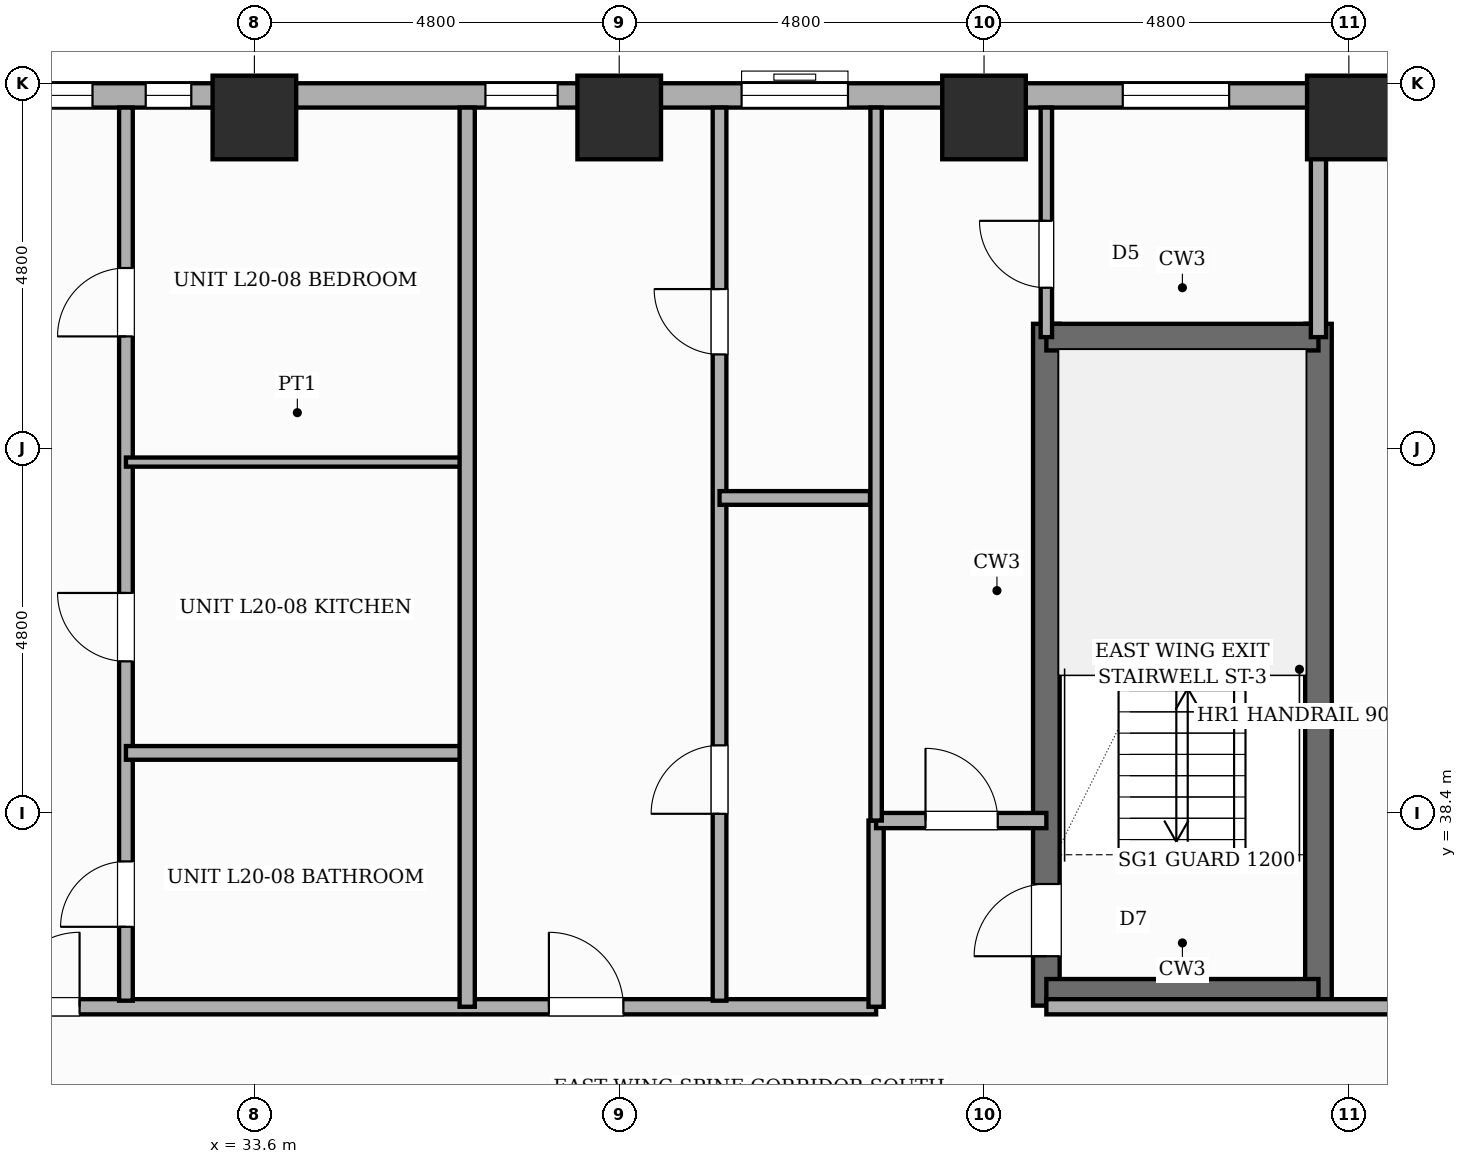
"""IFC4 building model, lengths in metres.
Left out: names, types, materials, properties, quantities, classifications, styles, units other than length and angle.
Written with IfcOpenShell. Run it as: python <this file> out.ifc"""

import sys

from ifc_helpers import new_model, si_unit, direction, frame, frame_2d, origin, origin_2d, place, context, subcontext, project, spatial, rectangle, extrude, element, fill, save


model = new_model("IFC4")
c1 = context("Model", 3, precision=1e-05, world=origin(), true_north=direction((0.0, 1.0)))
c2 = subcontext(c1, "Body", "Model", "MODEL_VIEW")
j1 = project(units=[si_unit("LENGTHUNIT", "METRE"), si_unit("PLANEANGLEUNIT", "RADIAN")], contexts=[c1])
p1 = place(None, origin())
s1 = spatial("IfcSite", under=j1, at=p1, CompositionType="ELEMENT")
p2 = place(p1, origin())
s2 = spatial("IfcBuilding", under=s1, at=p2, CompositionType="ELEMENT")
p3 = place(p2, frame((0.0, 0.0, 79.0)))
s3 = spatial("IfcBuildingStorey", under=s2, at=p3, CompositionType="ELEMENT", Elevation=79.0)
p4 = place(p3, frame((44.02, 35.865, 0.0), z_axis=(0.0, 0.0, 1.0), x_axis=(0.0, 1.0, 0.0)))
e1 = element("IfcWall", 1, at=p4, inside=s3, PredefinedType="SHEAR", context=c2, shape_type="SweptSolid", body=[
    extrude(rectangle(XDim=8.97, YDim=0.35, at=frame_2d((4.485, 0.0))), origin(), (0.0, 0.0, 1.0), 3.6),
])
p5 = place(p4, frame((0.65, 0.0, 0.0)))
e2 = element("IfcOpeningElement", 2, at=p5, cuts=e1, PredefinedType="OPENING", context=c2, shape_type="SweptSolid", body=[
    extrude(rectangle(XDim=0.95, YDim=2.1, at=frame_2d((0.475, 1.05))), frame((0.0, 0.185, 0.0), z_axis=(0.0, -1.0, 0.0), x_axis=(1.0, 0.0, 0.0)), (0.0, 0.0, 1.0), 0.37),
])
p6 = place(p3, frame((47.6, 35.865, 0.0), z_axis=(0.0, 0.0, 1.0), x_axis=(0.0, 1.0, 0.0)))
e3 = element("IfcWall", 3, at=p6, inside=s3, PredefinedType="SHEAR", context=c2, shape_type="SweptSolid", body=[
    extrude(rectangle(XDim=8.97, YDim=0.35, at=frame_2d((4.485, 0.0))), origin(), (0.0, 0.0, 1.0), 3.6),
])
for number, where, z_axis, x_axis in (
    (4, (44.02, 36.04, 0.0), (0.0, 0.0, 1.0), (1.0, 0.0, 0.0)),
    (5, (44.02, 44.66, 0.0), (0.0, 0.0, 1.0), (1.0, 0.0, 0.0)),
):
    element("IfcWall", number, at=place(p3, frame(where, z_axis=z_axis, x_axis=x_axis)), inside=s3, PredefinedType="SHEAR", context=c2, shape_type="SweptSolid", body=[
        extrude(rectangle(XDim=3.58, YDim=0.35, at=frame_2d((1.79, 0.0))), origin(), (0.0, 0.0, 1.0), 3.6),
    ])
for number, where, z_axis, x_axis in (
    (6, (33.6, 47.55, 0.0), (0.0, 0.0, 1.0), (1.0, 0.0, 0.0)),
    (7, (38.4, 47.55, 0.0), (0.0, 0.0, 1.0), (1.0, 0.0, 0.0)),
    (8, (43.2, 47.55, 0.0), (0.0, 0.0, 1.0), (1.0, 0.0, 0.0)),
    (9, (48.0, 47.55, 0.0), (0.0, 0.0, 1.0), (1.0, 0.0, 0.0)),
):
    element("IfcColumn", number, at=place(p3, frame(where, z_axis=z_axis, x_axis=x_axis)), inside=s3, PredefinedType="COLUMN", context=c2, shape_type="SweptSolid", body=[
        extrude(rectangle(XDim=1.1, YDim=1.1, at=origin_2d()), origin(), (0.0, 0.0, 1.0), 3.6),
    ])
p7 = place(p3, frame((7.2, 47.84, 0.0), z_axis=(0.0, 0.0, 1.0), x_axis=(1.0, 0.0, 0.0)))
e10 = element("IfcWall", 10, at=p7, inside=s3, PredefinedType="STANDARD", context=c2, shape_type="SweptSolid", body=[
    extrude(rectangle(XDim=48.0, YDim=0.32, at=frame_2d((24.0, 0.0))), origin(), (0.0, 0.0, 1.0), 2.53),
])
p8 = place(p7, frame((24.97, 0.0, 0.45)))
e11 = element("IfcOpeningElement", 11, at=p8, cuts=e10, PredefinedType="OPENING", context=c2, shape_type="SweptSolid", body=[
    extrude(rectangle(XDim=0.6, YDim=1.8, at=frame_2d((0.3, 0.9))), frame((0.0, 0.17, 0.0), z_axis=(0.0, -1.0, 0.0), x_axis=(1.0, 0.0, 0.0)), (0.0, 0.0, 1.0), 0.34),
])
p9 = place(p7, frame((29.44, 0.0, 0.45)))
e12 = element("IfcOpeningElement", 12, at=p9, cuts=e10, PredefinedType="OPENING", context=c2, shape_type="SweptSolid", body=[
    extrude(rectangle(XDim=0.95, YDim=1.8, at=frame_2d((0.475, 0.9))), frame((0.0, 0.17, 0.0), z_axis=(0.0, -1.0, 0.0), x_axis=(1.0, 0.0, 0.0)), (0.0, 0.0, 1.0), 0.34),
])
p10 = place(p7, frame((43.414, 0.0, 0.45)))
e13 = element("IfcOpeningElement", 13, at=p10, cuts=e10, PredefinedType="OPENING", context=c2, shape_type="SweptSolid", body=[
    extrude(rectangle(XDim=0.95, YDim=1.8, at=frame_2d((0.475, 0.9))), frame((0.0, 0.17, 0.0), z_axis=(0.0, -1.0, 0.0), x_axis=(1.0, 0.0, 0.0)), (0.0, 0.0, 1.0), 0.34),
])
p11 = place(p7, frame((18.74, 0.0, 0.45)))
e14 = element("IfcOpeningElement", 14, at=p11, cuts=e10, PredefinedType="OPENING", context=c2, shape_type="SweptSolid", body=[
    extrude(rectangle(XDim=0.95, YDim=1.8, at=frame_2d((0.475, 0.9))), frame((0.0, 0.17, 0.0), z_axis=(0.0, -1.0, 0.0), x_axis=(1.0, 0.0, 0.0)), (0.0, 0.0, 1.0), 0.34),
])
p12 = place(p7, frame((37.825, 0.0, 0.65)))
e15 = element("IfcOpeningElement", 15, at=p12, cuts=e10, PredefinedType="OPENING", context=c2, shape_type="SweptSolid", body=[
    extrude(rectangle(XDim=1.4, YDim=1.1, at=frame_2d((0.7, 0.55))), frame((0.0, 0.17, 0.0), z_axis=(0.0, -1.0, 0.0), x_axis=(1.0, 0.0, 0.0)), (0.0, 0.0, 1.0), 0.34),
])
p13 = place(p7, frame((0.47, 0.0, 0.45)))
e16 = element("IfcOpeningElement", 16, at=p13, cuts=e10, PredefinedType="OPENING", context=c2, shape_type="SweptSolid", body=[
    extrude(rectangle(XDim=0.95, YDim=1.8, at=frame_2d((0.475, 0.9))), frame((0.0, 0.17, 0.0), z_axis=(0.0, -1.0, 0.0), x_axis=(1.0, 0.0, 0.0)), (0.0, 0.0, 1.0), 0.34),
])
p14 = place(p7, frame((5.265, 0.0, 0.45)))
e17 = element("IfcOpeningElement", 17, at=p14, cuts=e10, PredefinedType="OPENING", context=c2, shape_type="SweptSolid", body=[
    extrude(rectangle(XDim=0.95, YDim=1.8, at=frame_2d((0.475, 0.9))), frame((0.0, 0.17, 0.0), z_axis=(0.0, -1.0, 0.0), x_axis=(1.0, 0.0, 0.0)), (0.0, 0.0, 1.0), 0.34),
])
p15 = place(p7, frame((22.87, 0.0, 0.65)))
e18 = element("IfcOpeningElement", 18, at=p15, cuts=e10, PredefinedType="OPENING", context=c2, shape_type="SweptSolid", body=[
    extrude(rectangle(XDim=1.4, YDim=1.1, at=frame_2d((0.7, 0.55))), frame((0.0, 0.17, 0.0), z_axis=(0.0, -1.0, 0.0), x_axis=(1.0, 0.0, 0.0)), (0.0, 0.0, 1.0), 0.34),
])
p16 = place(p7, frame((32.81, 0.0, 0.65)))
e19 = element("IfcOpeningElement", 19, at=p16, cuts=e10, PredefinedType="OPENING", context=c2, shape_type="SweptSolid", body=[
    extrude(rectangle(XDim=1.4, YDim=1.1, at=frame_2d((0.7, 0.55))), frame((0.0, 0.17, 0.0), z_axis=(0.0, -1.0, 0.0), x_axis=(1.0, 0.0, 0.0)), (0.0, 0.0, 1.0), 0.34),
])
p17 = place(p7, frame((41.809, 0.0, 0.45)))
e20 = element("IfcOpeningElement", 20, at=p17, cuts=e10, PredefinedType="OPENING", context=c2, shape_type="SweptSolid", body=[
    extrude(rectangle(XDim=0.95, YDim=1.8, at=frame_2d((0.475, 0.9))), frame((0.0, 0.17, 0.0), z_axis=(0.0, -1.0, 0.0), x_axis=(1.0, 0.0, 0.0)), (0.0, 0.0, 1.0), 0.34),
])
p18 = place(p3, frame((27.35, 35.85, 0.0), z_axis=(0.0, 0.0, 1.0), x_axis=(1.0, 0.0, 0.0)))
e21 = element("IfcWall", 21, at=p18, inside=s3, PredefinedType="PARTITIONING", context=c2, shape_type="SweptSolid", body=[
    extrude(rectangle(XDim=14.43, YDim=0.2, at=frame_2d((7.215, 0.0))), origin(), (0.0, 0.0, 1.0), 3.35),
])
p19 = place(p18, frame((2.97, 0.0, 0.0)))
e22 = element("IfcOpeningElement", 22, at=p19, cuts=e21, PredefinedType="OPENING", context=c2, shape_type="SweptSolid", body=[
    extrude(rectangle(XDim=0.98, YDim=2.18, at=frame_2d((0.49, 1.09))), frame((0.0, 0.11, 0.0), z_axis=(0.0, -1.0, 0.0), x_axis=(1.0, 0.0, 0.0)), (0.0, 0.0, 1.0), 0.22),
])
p20 = place(p18, frame((10.125, 0.0, 0.0)))
e23 = element("IfcOpeningElement", 23, at=p20, cuts=e21, PredefinedType="OPENING", context=c2, shape_type="SweptSolid", body=[
    extrude(rectangle(XDim=0.98, YDim=2.18, at=frame_2d((0.49, 1.09))), frame((0.0, 0.11, 0.0), z_axis=(0.0, -1.0, 0.0), x_axis=(1.0, 0.0, 0.0)), (0.0, 0.0, 1.0), 0.22),
])
p21 = place(p3, frame((44.02, 35.85, 0.0), z_axis=(0.0, 0.0, 1.0), x_axis=(1.0, 0.0, 0.0)))
e24 = element("IfcWall", 24, at=p21, inside=s3, PredefinedType="PARTITIONING", context=c2, shape_type="SweptSolid", body=[
    extrude(rectangle(XDim=13.26, YDim=0.2, at=frame_2d((6.63, 0.0))), origin(), (0.0, 0.0, 1.0), 3.35),
])
p22 = place(p21, frame((4.549, 0.0, 0.0)))
e25 = element("IfcOpeningElement", 25, at=p22, cuts=e24, PredefinedType="OPENING", context=c2, shape_type="SweptSolid", body=[
    extrude(rectangle(XDim=0.98, YDim=2.18, at=frame_2d((0.49, 1.09))), frame((0.0, 0.11, 0.0), z_axis=(0.0, -1.0, 0.0), x_axis=(1.0, 0.0, 0.0)), (0.0, 0.0, 1.0), 0.22),
])
p23 = place(p3, frame((41.78, 35.85, 0.0), z_axis=(0.0, 0.0, 1.0), x_axis=(0.0, 1.0, 0.0)))
e26 = element("IfcWall", 26, at=p23, inside=s3, PredefinedType="PARTITIONING", context=c2, shape_type="SweptSolid", body=[
    extrude(rectangle(XDim=2.45, YDim=0.2, at=frame_2d((1.225, 0.0))), origin(), (0.0, 0.0, 1.0), 3.35),
])
p24 = place(p3, frame((41.78, 38.3, 0.0), z_axis=(0.0, 0.0, 1.0), x_axis=(1.0, 0.0, 0.0)))
e27 = element("IfcWall", 27, at=p24, inside=s3, PredefinedType="PARTITIONING", context=c2, shape_type="SweptSolid", body=[
    extrude(rectangle(XDim=2.24, YDim=0.2, at=frame_2d((1.12, 0.0))), origin(), (0.0, 0.0, 1.0), 3.35),
])
p25 = place(p24, frame((0.65, 0.0, 0.0)))
e28 = element("IfcOpeningElement", 28, at=p25, cuts=e27, PredefinedType="OPENING", context=c2, shape_type="SweptSolid", body=[
    extrude(rectangle(XDim=0.95, YDim=2.15, at=frame_2d((0.475, 1.075))), frame((0.0, 0.11, 0.0), z_axis=(0.0, -1.0, 0.0), x_axis=(1.0, 0.0, 0.0)), (0.0, 0.0, 1.0), 0.22),
])
p26 = place(p3, frame((31.91, 35.93, 0.0), z_axis=(0.0, 0.0, 1.0), x_axis=(0.0, 1.0, 0.0)))
e29 = element("IfcWall", 29, at=p26, inside=s3, PredefinedType="PLUMBINGWALL", context=c2, shape_type="SweptSolid", body=[
    extrude(rectangle(XDim=11.75, YDim=0.18, at=frame_2d((5.875, 0.0))), origin(), (0.0, 0.0, 1.0), 3.35),
])
p27 = place(p26, frame((0.972, 0.0, 0.0)))
e30 = element("IfcOpeningElement", 30, at=p27, cuts=e29, PredefinedType="OPENING", context=c2, shape_type="SweptSolid", body=[
    extrude(rectangle(XDim=0.86, YDim=2.1, at=frame_2d((0.43, 1.05))), frame((0.0, 0.1, 0.0), z_axis=(0.0, -1.0, 0.0), x_axis=(1.0, 0.0, 0.0)), (0.0, 0.0, 1.0), 0.2),
])
p28 = place(p26, frame((4.464, 0.0, 0.0)))
e31 = element("IfcOpeningElement", 31, at=p28, cuts=e29, PredefinedType="OPENING", context=c2, shape_type="SweptSolid", body=[
    extrude(rectangle(XDim=0.9, YDim=2.15, at=frame_2d((0.45, 1.075))), frame((0.0, 0.1, 0.0), z_axis=(0.0, -1.0, 0.0), x_axis=(1.0, 0.0, 0.0)), (0.0, 0.0, 1.0), 0.2),
])
p29 = place(p26, frame((8.739, 0.0, 0.0)))
e32 = element("IfcOpeningElement", 32, at=p29, cuts=e29, PredefinedType="OPENING", context=c2, shape_type="SweptSolid", body=[
    extrude(rectangle(XDim=0.9, YDim=2.15, at=frame_2d((0.45, 1.075))), frame((0.0, 0.1, 0.0), z_axis=(0.0, -1.0, 0.0), x_axis=(1.0, 0.0, 0.0)), (0.0, 0.0, 1.0), 0.2),
])
p30 = place(p3, frame((31.91, 39.19, 0.0), z_axis=(0.0, 0.0, 1.0), x_axis=(1.0, 0.0, 0.0)))
e33 = element("IfcWall", 33, at=p30, inside=s3, PredefinedType="PLUMBINGWALL", context=c2, shape_type="SweptSolid", body=[
    extrude(rectangle(XDim=4.51, YDim=0.18, at=frame_2d((2.255, 0.0))), origin(), (0.0, 0.0, 1.0), 3.35),
])
p31 = place(p3, frame((31.91, 43.016, 0.0), z_axis=(0.0, 0.0, 1.0), x_axis=(1.0, 0.0, 0.0)))
e34 = element("IfcWall", 34, at=p31, inside=s3, PredefinedType="PARTITIONING", context=c2, shape_type="SweptSolid", body=[
    extrude(rectangle(XDim=4.51, YDim=0.12, at=frame_2d((2.255, 0.0))), origin(), (0.0, 0.0, 1.0), 3.35),
])
p32 = place(p3, frame((36.4, 35.85, 0.0), z_axis=(0.0, 0.0, 1.0), x_axis=(0.0, 1.0, 0.0)))
e35 = element("IfcWall", 35, at=p32, inside=s3, PredefinedType="SOLIDWALL", context=c2, shape_type="SweptSolid", body=[
    extrude(rectangle(XDim=11.83, YDim=0.2, at=frame_2d((5.915, 0.0))), origin(), (0.0, 0.0, 1.0), 3.35),
])
p33 = place(p3, frame((39.72, 35.93, 0.0), z_axis=(0.0, 0.0, 1.0), x_axis=(0.0, 1.0, 0.0)))
e36 = element("IfcWall", 36, at=p33, inside=s3, PredefinedType="PLUMBINGWALL", context=c2, shape_type="SweptSolid", body=[
    extrude(rectangle(XDim=11.75, YDim=0.18, at=frame_2d((5.875, 0.0))), origin(), (0.0, 0.0, 1.0), 3.35),
])
p34 = place(p33, frame((2.459, 0.0, 0.0)))
e37 = element("IfcOpeningElement", 37, at=p34, cuts=e36, PredefinedType="OPENING", context=c2, shape_type="SweptSolid", body=[
    extrude(rectangle(XDim=0.9, YDim=2.15, at=frame_2d((0.45, 1.075))), frame((0.0, 0.1, 0.0), z_axis=(0.0, -1.0, 0.0), x_axis=(1.0, 0.0, 0.0)), (0.0, 0.0, 1.0), 0.2),
])
p35 = place(p33, frame((8.502, 0.0, 0.0)))
e38 = element("IfcOpeningElement", 38, at=p35, cuts=e36, PredefinedType="OPENING", context=c2, shape_type="SweptSolid", body=[
    extrude(rectangle(XDim=0.86, YDim=2.1, at=frame_2d((0.43, 1.05))), frame((0.0, 0.1, 0.0), z_axis=(0.0, -1.0, 0.0), x_axis=(1.0, 0.0, 0.0)), (0.0, 0.0, 1.0), 0.2),
])
p36 = place(p3, frame((39.72, 42.544, 0.0), z_axis=(0.0, 0.0, 1.0), x_axis=(1.0, 0.0, 0.0)))
e39 = element("IfcWall", 39, at=p36, inside=s3, PredefinedType="PLUMBINGWALL", context=c2, shape_type="SweptSolid", body=[
    extrude(rectangle(XDim=1.98, YDim=0.18, at=frame_2d((0.99, 0.0))), origin(), (0.0, 0.0, 1.0), 3.35),
])
p37 = place(p3, frame((41.78, 38.3, 0.0), z_axis=(0.0, 0.0, 1.0), x_axis=(0.0, 1.0, 0.0)))
e40 = element("IfcWall", 40, at=p37, inside=s3, PredefinedType="PARTITIONING", context=c2, shape_type="SweptSolid", body=[
    extrude(rectangle(XDim=9.38, YDim=0.15, at=frame_2d((4.69, 0.0))), origin(), (0.0, 0.0, 1.0), 3.35),
])
p38 = place(p3, frame((44.02, 44.66, 0.0), z_axis=(0.0, 0.0, 1.0), x_axis=(0.0, 1.0, 0.0)))
e41 = element("IfcWall", 41, at=p38, inside=s3, PredefinedType="PARTITIONING", context=c2, shape_type="SweptSolid", body=[
    extrude(rectangle(XDim=3.02, YDim=0.15, at=frame_2d((1.51, 0.0))), origin(), (0.0, 0.0, 1.0), 3.35),
])
p39 = place(p38, frame((0.65, 0.0, 0.0)))
e42 = element("IfcOpeningElement", 42, at=p39, cuts=e41, PredefinedType="OPENING", context=c2, shape_type="SweptSolid", body=[
    extrude(rectangle(XDim=0.88, YDim=2.1, at=frame_2d((0.44, 1.05))), frame((0.0, 0.085, 0.0), z_axis=(0.0, -1.0, 0.0), x_axis=(1.0, 0.0, 0.0)), (0.0, 0.0, 1.0), 0.17),
])
p40 = place(p3, frame((47.6, 44.66, 0.0), z_axis=(0.0, 0.0, 1.0), x_axis=(0.0, 1.0, 0.0)))
e43 = element("IfcWall", 43, at=p40, inside=s3, PredefinedType="SOLIDWALL", context=c2, shape_type="SweptSolid", body=[
    extrude(rectangle(XDim=3.02, YDim=0.2, at=frame_2d((1.51, 0.0))), origin(), (0.0, 0.0, 1.0), 3.35),
])
p41 = place(p8, origin())
e44 = element("IfcWindow", 44, at=p41, inside=s3, PartitioningType="SINGLE_PANEL", PredefinedType="WINDOW", context=c2, shape_type="SweptSolid", body=[
    extrude(rectangle(XDim=0.6, YDim=1.8, at=frame_2d((0.3, 0.9))), frame((0.0, 0.03, 0.0), z_axis=(0.0, -1.0, 0.0), x_axis=(1.0, 0.0, 0.0)), (0.0, 0.0, 1.0), 0.06),
])
fill(e11, e44)
p42 = place(p9, origin())
e45 = element("IfcWindow", 45, at=p42, inside=s3, PartitioningType="SINGLE_PANEL", PredefinedType="WINDOW", context=c2, shape_type="SweptSolid", body=[
    extrude(rectangle(XDim=0.95, YDim=1.8, at=frame_2d((0.475, 0.9))), frame((0.0, 0.03, 0.0), z_axis=(0.0, -1.0, 0.0), x_axis=(1.0, 0.0, 0.0)), (0.0, 0.0, 1.0), 0.06),
])
fill(e12, e45)
p43 = place(p12, origin())
e46 = element("IfcWindow", 46, at=p43, inside=s3, PartitioningType="SINGLE_PANEL", PredefinedType="WINDOW", context=c2, shape_type="SweptSolid", body=[
    extrude(rectangle(XDim=1.4, YDim=1.1, at=frame_2d((0.7, 0.55))), frame((0.0, 0.03, 0.0), z_axis=(0.0, -1.0, 0.0), x_axis=(1.0, 0.0, 0.0)), (0.0, 0.0, 1.0), 0.06),
])
fill(e15, e46)
p44 = place(p15, origin())
e47 = element("IfcWindow", 47, at=p44, inside=s3, PartitioningType="SINGLE_PANEL", PredefinedType="WINDOW", context=c2, shape_type="SweptSolid", body=[
    extrude(rectangle(XDim=1.4, YDim=1.1, at=frame_2d((0.7, 0.55))), frame((0.0, 0.03, 0.0), z_axis=(0.0, -1.0, 0.0), x_axis=(1.0, 0.0, 0.0)), (0.0, 0.0, 1.0), 0.06),
])
fill(e18, e47)
p45 = place(p16, origin())
e48 = element("IfcWindow", 48, at=p45, inside=s3, PartitioningType="SINGLE_PANEL", PredefinedType="WINDOW", context=c2, shape_type="SweptSolid", body=[
    extrude(rectangle(XDim=1.4, YDim=1.1, at=frame_2d((0.7, 0.55))), frame((0.0, 0.03, 0.0), z_axis=(0.0, -1.0, 0.0), x_axis=(1.0, 0.0, 0.0)), (0.0, 0.0, 1.0), 0.06),
])
fill(e19, e48)
p46 = place(p5, origin())
e49 = element("IfcDoor", 49, at=p46, inside=s3, OperationType="SINGLE_SWING_LEFT", PredefinedType="DOOR", context=c2, shape_type="SweptSolid", body=[
    extrude(rectangle(XDim=0.95, YDim=2.1, at=frame_2d((0.475, 1.05))), frame((0.0, 0.025, 0.0), z_axis=(0.0, -1.0, 0.0), x_axis=(1.0, 0.0, 0.0)), (0.0, 0.0, 1.0), 0.05),
])
fill(e2, e49)
p47 = place(p19, origin())
e50 = element("IfcDoor", 50, at=p47, inside=s3, OperationType="SINGLE_SWING_RIGHT", PredefinedType="DOOR", context=c2, shape_type="SweptSolid", body=[
    extrude(rectangle(XDim=0.98, YDim=2.18, at=frame_2d((0.49, 1.09))), frame((0.0, 0.025, 0.0), z_axis=(0.0, -1.0, 0.0), x_axis=(1.0, 0.0, 0.0)), (0.0, 0.0, 1.0), 0.05),
])
fill(e22, e50)
p48 = place(p27, origin())
e51 = element("IfcDoor", 51, at=p48, inside=s3, OperationType="SINGLE_SWING_LEFT", PredefinedType="DOOR", context=c2, shape_type="SweptSolid", body=[
    extrude(rectangle(XDim=0.86, YDim=2.1, at=frame_2d((0.43, 1.05))), frame((0.0, 0.025, 0.0), z_axis=(0.0, -1.0, 0.0), x_axis=(1.0, 0.0, 0.0)), (0.0, 0.0, 1.0), 0.05),
])
fill(e30, e51)
p49 = place(p28, origin())
e52 = element("IfcDoor", 52, at=p49, inside=s3, OperationType="SINGLE_SWING_RIGHT", PredefinedType="DOOR", context=c2, shape_type="SweptSolid", body=[
    extrude(rectangle(XDim=0.9, YDim=2.15, at=frame_2d((0.45, 1.075))), frame((0.0, 0.025, 0.0), z_axis=(0.0, -1.0, 0.0), x_axis=(1.0, 0.0, 0.0)), (0.0, 0.0, 1.0), 0.05),
])
fill(e31, e52)
p50 = place(p29, origin())
e53 = element("IfcDoor", 53, at=p50, inside=s3, OperationType="SINGLE_SWING_LEFT", PredefinedType="DOOR", context=c2, shape_type="SweptSolid", body=[
    extrude(rectangle(XDim=0.9, YDim=2.15, at=frame_2d((0.45, 1.075))), frame((0.0, 0.025, 0.0), z_axis=(0.0, -1.0, 0.0), x_axis=(1.0, 0.0, 0.0)), (0.0, 0.0, 1.0), 0.05),
])
fill(e32, e53)
p51 = place(p20, origin())
e54 = element("IfcDoor", 54, at=p51, inside=s3, OperationType="SINGLE_SWING_LEFT", PredefinedType="DOOR", context=c2, shape_type="SweptSolid", body=[
    extrude(rectangle(XDim=0.98, YDim=2.18, at=frame_2d((0.49, 1.09))), frame((0.0, 0.025, 0.0), z_axis=(0.0, -1.0, 0.0), x_axis=(1.0, 0.0, 0.0)), (0.0, 0.0, 1.0), 0.05),
])
fill(e23, e54)
p52 = place(p34, origin())
e55 = element("IfcDoor", 55, at=p52, inside=s3, OperationType="SINGLE_SWING_LEFT", PredefinedType="DOOR", context=c2, shape_type="SweptSolid", body=[
    extrude(rectangle(XDim=0.9, YDim=2.15, at=frame_2d((0.45, 1.075))), frame((0.0, 0.025, 0.0), z_axis=(0.0, -1.0, 0.0), x_axis=(1.0, 0.0, 0.0)), (0.0, 0.0, 1.0), 0.05),
])
fill(e37, e55)
p53 = place(p35, origin())
e56 = element("IfcDoor", 56, at=p53, inside=s3, OperationType="SINGLE_SWING_RIGHT", PredefinedType="DOOR", context=c2, shape_type="SweptSolid", body=[
    extrude(rectangle(XDim=0.86, YDim=2.1, at=frame_2d((0.43, 1.05))), frame((0.0, 0.025, 0.0), z_axis=(0.0, -1.0, 0.0), x_axis=(1.0, 0.0, 0.0)), (0.0, 0.0, 1.0), 0.05),
])
fill(e38, e56)
p54 = place(p25, origin())
e57 = element("IfcDoor", 57, at=p54, inside=s3, OperationType="SINGLE_SWING_LEFT", PredefinedType="DOOR", context=c2, shape_type="SweptSolid", body=[
    extrude(rectangle(XDim=0.95, YDim=2.15, at=frame_2d((0.475, 1.075))), frame((0.0, 0.025, 0.0), z_axis=(0.0, -1.0, 0.0), x_axis=(1.0, 0.0, 0.0)), (0.0, 0.0, 1.0), 0.05),
])
fill(e28, e57)
p55 = place(p39, origin())
e58 = element("IfcDoor", 58, at=p55, inside=s3, OperationType="SINGLE_SWING_RIGHT", PredefinedType="DOOR", context=c2, shape_type="SweptSolid", body=[
    extrude(rectangle(XDim=0.88, YDim=2.1, at=frame_2d((0.44, 1.05))), frame((0.0, 0.025, 0.0), z_axis=(0.0, -1.0, 0.0), x_axis=(1.0, 0.0, 0.0)), (0.0, 0.0, 1.0), 0.05),
])
fill(e42, e58)
save(model, sys.argv[1])
